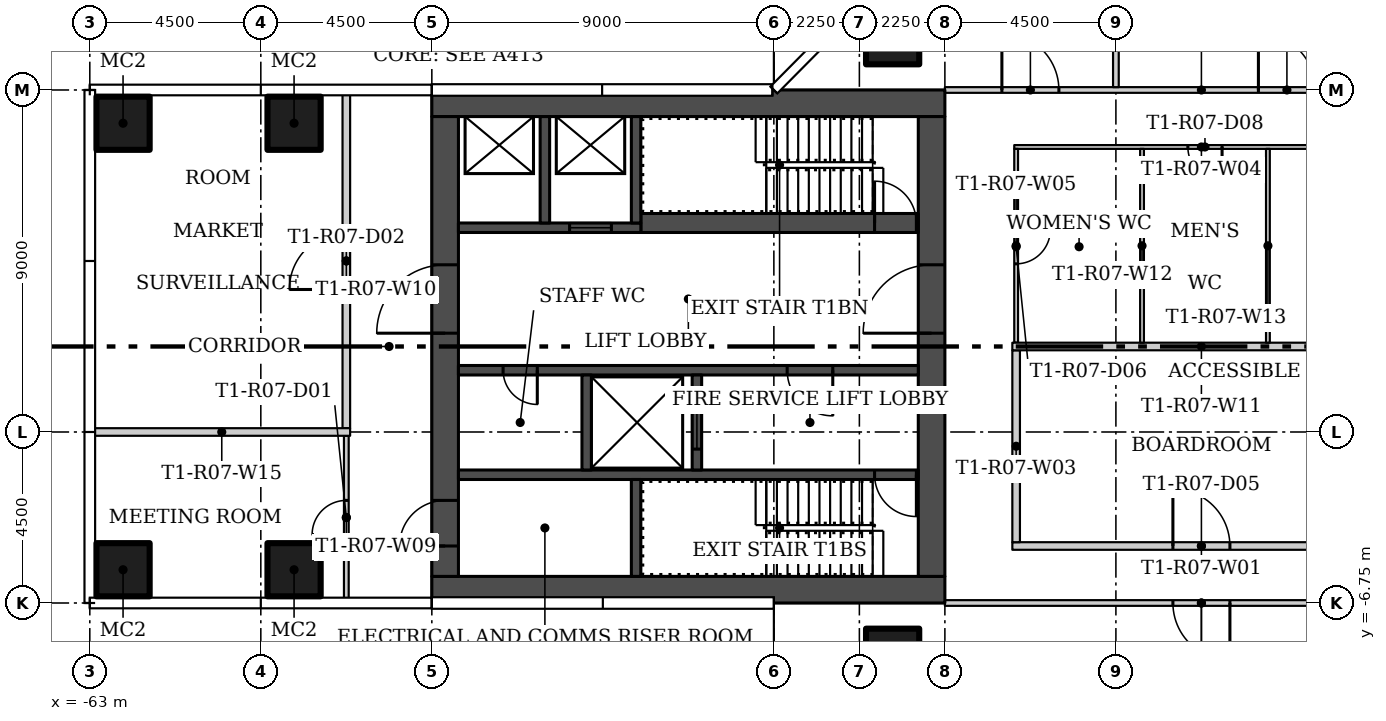
"""IFC4 building model, lengths in metres.
Left out: names, types, materials, properties, quantities, classifications, styles, units other than length and angle.
Written with IfcOpenShell. Run it as: python <this file> out.ifc"""

import sys

from ifc_helpers import new_model, si_unit, direction, frame, frame_2d, origin, origin_2d, place, context, subcontext, project, spatial, rectangle, hollow_rectangle, extrude, element, fill, save


model = new_model("IFC4")
c1 = context("Model", 3, precision=1e-05, world=origin(), true_north=direction((0.0, 1.0)))
c2 = subcontext(c1, "Body", "Model", "MODEL_VIEW")
j1 = project(units=[si_unit("LENGTHUNIT", "METRE"), si_unit("PLANEANGLEUNIT", "RADIAN")], contexts=[c1])
p1 = place(None, origin())
s1 = spatial("IfcSite", under=j1, at=p1, CompositionType="ELEMENT")
p2 = place(p1, origin())
s2 = spatial("IfcBuilding", under=s1, at=p2, CompositionType="ELEMENT")
p3 = place(p2, frame((0.0, 0.0, 73.2)))
s3 = spatial("IfcBuildingStorey", under=s2, at=p3, CompositionType="ELEMENT", Elevation=73.2)
for number, where in (
    (1, (-41.875, 8.125, 0.0)),
    (2, (-41.875, -8.125, 0.0)),
    (3, (-57.625, -5.875, 0.0)),
    (4, (-62.125, -5.875, 0.0)),
    (5, (-57.625, 5.875, 0.0)),
    (6, (-62.125, 5.875, 0.0)),
):
    element("IfcColumn", number, at=place(p3, frame(where)), inside=s3, PredefinedType="COLUMN", context=c2, shape_type="SweptSolid", body=[
        extrude(hollow_rectangle(XDim=1.4, YDim=1.4, WallThickness=0.05, at=origin_2d()), origin(), (0.0, 0.0, 1.0), 3.45),
    ])
p4 = place(p3, frame((-38.725, -5.25, 0.0)))
e7 = element("IfcWall", 7, at=p4, inside=s3, PredefinedType="PARTITIONING", context=c2, shape_type="SweptSolid", body=[
    extrude(rectangle(XDim=9.95, YDim=0.2, at=frame_2d((4.975, 0.0))), origin(), (0.0, 0.0, 1.0), 3.45),
])
p5 = place(p4, frame((4.225, 0.0, 0.0)))
e8 = element("IfcOpeningElement", 8, at=p5, cuts=e7, PredefinedType="OPENING", context=c2, shape_type="SweptSolid", body=[
    extrude(rectangle(XDim=1.5, YDim=2.4, at=frame_2d((0.75, 1.2))), frame((0.0, 0.11, 0.0), z_axis=(0.0, -1.0, 0.0), x_axis=(1.0, 0.0, 0.0)), (0.0, 0.0, 1.0), 0.22),
])
p6 = place(p3, frame((-38.625, -0.1, 0.0), z_axis=(0.0, 0.0, 1.0), x_axis=(0.0, -1.0, 0.0)))
e9 = element("IfcWall", 9, at=p6, inside=s3, PredefinedType="PARTITIONING", context=c2, shape_type="SweptSolid", body=[
    extrude(rectangle(XDim=5.05, YDim=0.2, at=frame_2d((2.525, 0.0))), origin(), (0.0, 0.0, 1.0), 3.45),
])
p7 = place(p3, frame((-28.825, 5.25, 0.0), z_axis=(0.0, 0.0, 1.0), x_axis=(-1.0, 0.0, 0.0)))
e10 = element("IfcWall", 10, at=p7, inside=s3, PredefinedType="PARTITIONING", context=c2, shape_type="SweptSolid", body=[
    extrude(rectangle(XDim=9.85, YDim=0.1, at=frame_2d((4.925, 0.0))), origin(), (0.0, 0.0, 1.0), 3.45),
])
p8 = place(p7, frame((4.381, 0.0, 0.0)))
e11 = element("IfcOpeningElement", 11, at=p8, cuts=e10, PredefinedType="OPENING", context=c2, shape_type="SweptSolid", body=[
    extrude(rectangle(XDim=0.9, YDim=2.1, at=frame_2d((0.45, 1.05))), frame((0.0, 0.06, 0.0), z_axis=(0.0, -1.0, 0.0), x_axis=(1.0, 0.0, 0.0)), (0.0, 0.0, 1.0), 0.12),
])
p9 = place(p3, frame((-38.625, 5.2, 0.0), z_axis=(0.0, 0.0, 1.0), x_axis=(0.0, -1.0, 0.0)))
e12 = element("IfcWall", 12, at=p9, inside=s3, PredefinedType="PARTITIONING", context=c2, shape_type="SweptSolid", body=[
    extrude(rectangle(XDim=5.1, YDim=0.1, at=frame_2d((2.55, 0.0))), origin(), (0.0, 0.0, 1.0), 3.45),
])
p10 = place(p9, frame((2.125, 0.0, 0.0)))
e13 = element("IfcOpeningElement", 13, at=p10, cuts=e12, PredefinedType="OPENING", context=c2, shape_type="SweptSolid", body=[
    extrude(rectangle(XDim=0.9, YDim=2.1, at=frame_2d((0.45, 1.05))), frame((0.0, 0.06, 0.0), z_axis=(0.0, -1.0, 0.0), x_axis=(1.0, 0.0, 0.0)), (0.0, 0.0, 1.0), 0.12),
])
p11 = place(p3, frame((-40.5, 6.75, 0.0)))
e14 = element("IfcWall", 14, at=p11, inside=s3, PredefinedType="PARTITIONING", context=c2, shape_type="SweptSolid", body=[
    extrude(rectangle(XDim=13.5, YDim=0.15, at=frame_2d((6.75, 0.0))), origin(), (0.0, 0.0, 1.0), 3.45),
])
p12 = place(p11, frame((1.5, 0.0, 0.0)))
e15 = element("IfcOpeningElement", 15, at=p12, cuts=e14, PredefinedType="OPENING", context=c2, shape_type="SweptSolid", body=[
    extrude(rectangle(XDim=1.5, YDim=2.1, at=frame_2d((0.75, 1.05))), frame((0.0, 0.085, 0.0), z_axis=(0.0, -1.0, 0.0), x_axis=(1.0, 0.0, 0.0)), (0.0, 0.0, 1.0), 0.17),
])
p13 = place(p11, frame((8.25, 0.0, 0.0)))
e16 = element("IfcOpeningElement", 16, at=p13, cuts=e14, PredefinedType="OPENING", context=c2, shape_type="SweptSolid", body=[
    extrude(rectangle(XDim=1.5, YDim=2.1, at=frame_2d((0.75, 1.05))), frame((0.0, 0.085, 0.0), z_axis=(0.0, -1.0, 0.0), x_axis=(1.0, 0.0, 0.0)), (0.0, 0.0, 1.0), 0.17),
])
p14 = place(p3, frame((-27.0, -6.75, 0.0), z_axis=(0.0, 0.0, 1.0), x_axis=(-1.0, 0.0, 0.0)))
e17 = element("IfcWall", 17, at=p14, inside=s3, PredefinedType="PARTITIONING", context=c2, shape_type="SweptSolid", body=[
    extrude(rectangle(XDim=13.5, YDim=0.15, at=frame_2d((6.75, 0.0))), origin(), (0.0, 0.0, 1.0), 3.45),
])
p15 = place(p14, frame((6.0, 0.0, 0.0)))
e18 = element("IfcOpeningElement", 18, at=p15, cuts=e17, PredefinedType="OPENING", context=c2, shape_type="SweptSolid", body=[
    extrude(rectangle(XDim=1.5, YDim=2.1, at=frame_2d((0.75, 1.05))), frame((0.0, 0.085, 0.0), z_axis=(0.0, -1.0, 0.0), x_axis=(1.0, 0.0, 0.0)), (0.0, 0.0, 1.0), 0.17),
])
p16 = place(p3, frame((-56.25, -6.655, 0.0), z_axis=(0.0, 0.0, 1.0), x_axis=(0.0, 1.0, 0.0)))
e19 = element("IfcWall", 19, at=p16, inside=s3, PredefinedType="PARTITIONING", context=c2, shape_type="SweptSolid", body=[
    extrude(rectangle(XDim=4.305, YDim=0.125, at=frame_2d((2.152, 0.0))), origin(), (0.0, 0.0, 1.0), 3.45),
])
p17 = place(p16, frame((1.705, 0.0, 0.0)))
e20 = element("IfcOpeningElement", 20, at=p17, cuts=e19, PredefinedType="OPENING", context=c2, shape_type="SweptSolid", body=[
    extrude(rectangle(XDim=0.9, YDim=2.1, at=frame_2d((0.45, 1.05))), frame((0.0, 0.073, 0.0), z_axis=(0.0, -1.0, 0.0), x_axis=(1.0, 0.0, 0.0)), (0.0, 0.0, 1.0), 0.145),
])
p18 = place(p3, frame((-56.25, -2.15, 0.0), z_axis=(0.0, 0.0, 1.0), x_axis=(0.0, 1.0, 0.0)))
e21 = element("IfcWall", 21, at=p18, inside=s3, PredefinedType="PARTITIONING", context=c2, shape_type="SweptSolid", body=[
    extrude(rectangle(XDim=8.805, YDim=0.2, at=frame_2d((4.402, 0.0))), origin(), (0.0, 0.0, 1.0), 3.45),
])
p19 = place(p18, frame((3.65, 0.0, 0.0)))
e22 = element("IfcOpeningElement", 22, at=p19, cuts=e21, PredefinedType="OPENING", context=c2, shape_type="SweptSolid", body=[
    extrude(rectangle(XDim=1.5, YDim=2.1, at=frame_2d((0.75, 1.05))), frame((0.0, 0.11, 0.0), z_axis=(0.0, -1.0, 0.0), x_axis=(1.0, 0.0, 0.0)), (0.0, 0.0, 1.0), 0.22),
])
p20 = place(p3, frame((-28.775, 0.0, 0.0), z_axis=(0.0, 0.0, 1.0), x_axis=(-1.0, 0.0, 0.0)))
e23 = element("IfcWall", 23, at=p20, inside=s3, PredefinedType="PARTITIONING", context=c2, shape_type="SweptSolid", body=[
    extrude(rectangle(XDim=9.95, YDim=0.2, at=frame_2d((4.975, 0.0))), origin(), (0.0, 0.0, 1.0), 3.45),
])
for number, where, z_axis, x_axis in (
    (24, (-35.312, 0.1, 0.0), (0.0, 0.0, 1.0), (0.0, 1.0, 0.0)),
    (25, (-32.0, 0.1, 0.0), (0.0, 0.0, 1.0), (0.0, 1.0, 0.0)),
):
    element("IfcWall", number, at=place(p3, frame(where, z_axis=z_axis, x_axis=x_axis)), inside=s3, PredefinedType="PARTITIONING", context=c2, shape_type="SweptSolid", body=[
        extrude(rectangle(XDim=5.1, YDim=0.1, at=frame_2d((2.55, 0.0))), origin(), (0.0, 0.0, 1.0), 3.45),
    ])
p21 = place(p3, frame((-36.0, 6.825, 0.0), z_axis=(0.0, 0.0, 1.0), x_axis=(0.0, 1.0, 0.0)))
e26 = element("IfcWall", 26, at=p21, inside=s3, PredefinedType="PARTITIONING", context=c2, shape_type="SweptSolid", body=[
    extrude(rectangle(XDim=17.83, YDim=0.15, at=frame_2d((8.915, 0.0))), origin(), (0.0, 0.0, 1.0), 3.45),
])
p22 = place(p3, frame((-56.15, -2.25, 0.0), z_axis=(0.0, 0.0, 1.0), x_axis=(-1.0, 0.0, 0.0)))
e27 = element("IfcWall", 27, at=p22, inside=s3, PredefinedType="PARTITIONING", context=c2, shape_type="SweptSolid", body=[
    extrude(rectangle(XDim=6.755, YDim=0.2, at=frame_2d((3.377, 0.0))), origin(), (0.0, 0.0, 1.0), 3.45),
])
for number, where, z_axis, x_axis in (
    (28, (-40.5, -6.4, 0.0), (0.0, 0.0, 1.0), (-1.0, 0.0, 0.0)),
    (29, (-40.5, 6.4, 0.0), (0.0, 0.0, 1.0), (-1.0, 0.0, 0.0)),
):
    element("IfcWall", number, at=place(p3, frame(where, z_axis=z_axis, x_axis=x_axis)), inside=s3, PredefinedType="SHEAR", context=c2, shape_type="SweptSolid", body=[
        extrude(rectangle(XDim=13.5, YDim=0.7, at=frame_2d((6.75, 0.0))), origin(), (0.0, 0.0, 1.0), 3.45),
    ])
p23 = place(p3, frame((-40.85, -6.05, 0.0), z_axis=(0.0, 0.0, 1.0), x_axis=(0.0, 1.0, 0.0)))
e30 = element("IfcWall", 30, at=p23, inside=s3, PredefinedType="SHEAR", context=c2, shape_type="SweptSolid", body=[
    extrude(rectangle(XDim=12.1, YDim=0.7, at=frame_2d((6.05, 0.0))), origin(), (0.0, 0.0, 1.0), 3.45),
])
p24 = place(p23, frame((6.4, 0.0, 0.0)))
e31 = element("IfcOpeningElement", 31, at=p24, cuts=e30, PredefinedType="OPENING", context=c2, shape_type="SweptSolid", body=[
    extrude(rectangle(XDim=1.8, YDim=2.4, at=frame_2d((0.9, 1.2))), frame((0.0, 0.36, 0.0), z_axis=(0.0, -1.0, 0.0), x_axis=(1.0, 0.0, 0.0)), (0.0, 0.0, 1.0), 0.72),
])
p25 = place(p3, frame((-53.65, -6.05, 0.0), z_axis=(0.0, 0.0, 1.0), x_axis=(0.0, 1.0, 0.0)))
e32 = element("IfcWall", 32, at=p25, inside=s3, PredefinedType="SHEAR", context=c2, shape_type="SweptSolid", body=[
    extrude(rectangle(XDim=12.1, YDim=0.7, at=frame_2d((6.05, 0.0))), origin(), (0.0, 0.0, 1.0), 3.45),
])
p26 = place(p25, frame((0.8, 0.0, 0.0)))
e33 = element("IfcOpeningElement", 33, at=p26, cuts=e32, PredefinedType="OPENING", context=c2, shape_type="SweptSolid", body=[
    extrude(rectangle(XDim=1.2, YDim=2.1, at=frame_2d((0.6, 1.05))), frame((0.0, 0.36, 0.0), z_axis=(0.0, -1.0, 0.0), x_axis=(1.0, 0.0, 0.0)), (0.0, 0.0, 1.0), 0.72),
])
p27 = place(p25, frame((6.4, 0.0, 0.0)))
e34 = element("IfcOpeningElement", 34, at=p27, cuts=e32, PredefinedType="OPENING", context=c2, shape_type="SweptSolid", body=[
    extrude(rectangle(XDim=1.8, YDim=2.4, at=frame_2d((0.9, 1.2))), frame((0.0, 0.36, 0.0), z_axis=(0.0, -1.0, 0.0), x_axis=(1.0, 0.0, 0.0)), (0.0, 0.0, 1.0), 0.72),
])
p28 = place(p3, frame((-41.2, -3.375, 0.0), z_axis=(0.0, 0.0, 1.0), x_axis=(-1.0, 0.0, 0.0)))
e35 = element("IfcWall", 35, at=p28, inside=s3, PredefinedType="SHEAR", context=c2, shape_type="SweptSolid", body=[
    extrude(rectangle(XDim=12.1, YDim=0.25, at=frame_2d((6.05, 0.0))), origin(), (0.0, 0.0, 1.0), 3.45),
])
p29 = place(p28, frame((0.05, 0.0, 0.0)))
e36 = element("IfcOpeningElement", 36, at=p29, cuts=e35, PredefinedType="OPENING", context=c2, shape_type="SweptSolid", body=[
    extrude(rectangle(XDim=1.1, YDim=2.1, at=frame_2d((0.55, 1.05))), frame((0.0, 0.135, 0.0), z_axis=(0.0, -1.0, 0.0), x_axis=(1.0, 0.0, 0.0)), (0.0, 0.0, 1.0), 0.27),
])
p30 = place(p3, frame((-48.625, -6.05, 0.0), z_axis=(0.0, 0.0, 1.0), x_axis=(0.0, 1.0, 0.0)))
e37 = element("IfcWall", 37, at=p30, inside=s3, PredefinedType="SHEAR", context=c2, shape_type="SweptSolid", body=[
    extrude(rectangle(XDim=2.55, YDim=0.25, at=frame_2d((1.275, 0.0))), origin(), (0.0, 0.0, 1.0), 3.45),
])
p31 = place(p3, frame((-41.2, -0.625, 0.0), z_axis=(0.0, 0.0, 1.0), x_axis=(-1.0, 0.0, 0.0)))
e38 = element("IfcWall", 38, at=p31, inside=s3, PredefinedType="SHEAR", context=c2, shape_type="SweptSolid", body=[
    extrude(rectangle(XDim=12.1, YDim=0.25, at=frame_2d((6.05, 0.0))), origin(), (0.0, 0.0, 1.0), 3.45),
])
p32 = place(p31, frame((2.25, 0.0, 0.0)))
e39 = element("IfcOpeningElement", 39, at=p32, cuts=e38, PredefinedType="OPENING", context=c2, shape_type="SweptSolid", body=[
    extrude(rectangle(XDim=1.2, YDim=2.1, at=frame_2d((0.6, 1.05))), frame((0.0, 0.135, 0.0), z_axis=(0.0, -1.0, 0.0), x_axis=(1.0, 0.0, 0.0)), (0.0, 0.0, 1.0), 0.27),
])
p33 = place(p31, frame((10.025, 0.0, 0.0)))
e40 = element("IfcOpeningElement", 40, at=p33, cuts=e38, PredefinedType="OPENING", context=c2, shape_type="SweptSolid", body=[
    extrude(rectangle(XDim=0.9, YDim=2.1, at=frame_2d((0.45, 1.05))), frame((0.0, 0.135, 0.0), z_axis=(0.0, -1.0, 0.0), x_axis=(1.0, 0.0, 0.0)), (0.0, 0.0, 1.0), 0.27),
])
p34 = place(p3, frame((-47.025, -3.25, 0.0), z_axis=(0.0, 0.0, 1.0), x_axis=(0.0, 1.0, 0.0)))
e41 = element("IfcWall", 41, at=p34, inside=s3, PredefinedType="SHEAR", context=c2, shape_type="SweptSolid", body=[
    extrude(rectangle(XDim=2.5, YDim=0.25, at=frame_2d((1.25, 0.0))), origin(), (0.0, 0.0, 1.0), 3.45),
])
p35 = place(p34, frame((0.55, 0.0, 0.0)))
e42 = element("IfcOpeningElement", 42, at=p35, cuts=e41, PredefinedType="OPENING", context=c2, shape_type="SweptSolid", body=[
    extrude(rectangle(XDim=1.4, YDim=2.4, at=frame_2d((0.7, 1.2))), frame((0.0, 0.135, 0.0), z_axis=(0.0, -1.0, 0.0), x_axis=(1.0, 0.0, 0.0)), (0.0, 0.0, 1.0), 0.27),
])
p36 = place(p3, frame((-49.925, -3.25, 0.0), z_axis=(0.0, 0.0, 1.0), x_axis=(0.0, 1.0, 0.0)))
e43 = element("IfcWall", 43, at=p36, inside=s3, PredefinedType="SHEAR", context=c2, shape_type="SweptSolid", body=[
    extrude(rectangle(XDim=2.5, YDim=0.25, at=frame_2d((1.25, 0.0))), origin(), (0.0, 0.0, 1.0), 3.45),
])
p37 = place(p3, frame((-48.5, 3.25, 0.0)))
e44 = element("IfcWall", 44, at=p37, inside=s3, PredefinedType="SHEAR", context=c2, shape_type="SweptSolid", body=[
    extrude(rectangle(XDim=7.3, YDim=0.5, at=frame_2d((3.65, 0.0))), origin(), (0.0, 0.0, 1.0), 3.45),
])
p38 = place(p37, frame((6.15, 0.0, 0.0)))
e45 = element("IfcOpeningElement", 45, at=p38, cuts=e44, PredefinedType="OPENING", context=c2, shape_type="SweptSolid", body=[
    extrude(rectangle(XDim=1.1, YDim=2.1, at=frame_2d((0.55, 1.05))), frame((0.0, 0.26, 0.0), z_axis=(0.0, -1.0, 0.0), x_axis=(1.0, 0.0, 0.0)), (0.0, 0.0, 1.0), 0.52),
])
p39 = place(p3, frame((-48.5, 3.125, 0.0), z_axis=(0.0, 0.0, 1.0), x_axis=(-1.0, 0.0, 0.0)))
e46 = element("IfcWall", 46, at=p39, inside=s3, PredefinedType="SHEAR", context=c2, shape_type="SweptSolid", body=[
    extrude(rectangle(XDim=4.8, YDim=0.25, at=frame_2d((2.4, 0.0))), origin(), (0.0, 0.0, 1.0), 3.45),
])
p40 = place(p39, frame((0.775, 0.0, 0.0)))
e47 = element("IfcOpeningElement", 47, at=p40, cuts=e46, PredefinedType="OPENING", context=c2, shape_type="SweptSolid", body=[
    extrude(rectangle(XDim=1.1, YDim=2.1, at=frame_2d((0.55, 1.05))), frame((0.0, 0.135, 0.0), z_axis=(0.0, -1.0, 0.0), x_axis=(1.0, 0.0, 0.0)), (0.0, 0.0, 1.0), 0.27),
])
for number, where, z_axis, x_axis in (
    (48, (-48.625, 3.25, 0.0), (0.0, 0.0, 1.0), (0.0, 1.0, 0.0)),
    (49, (-51.025, 3.25, 0.0), (0.0, 0.0, 1.0), (0.0, 1.0, 0.0)),
):
    element("IfcWall", number, at=place(p3, frame(where, z_axis=z_axis, x_axis=x_axis)), inside=s3, PredefinedType="SHEAR", context=c2, shape_type="SweptSolid", body=[
        extrude(rectangle(XDim=2.8, YDim=0.25, at=frame_2d((1.4, 0.0))), origin(), (0.0, 0.0, 1.0), 3.45),
    ])
p41 = place(p17, origin())
e50 = element("IfcDoor", 50, at=p41, inside=s3, OperationType="SINGLE_SWING_RIGHT", PredefinedType="DOOR", context=c2, shape_type="SweptSolid", body=[
    extrude(rectangle(XDim=0.9, YDim=2.1, at=frame_2d((0.45, 1.05))), frame((0.0, 0.025, 0.0), z_axis=(0.0, -1.0, 0.0), x_axis=(1.0, 0.0, 0.0)), (0.0, 0.0, 1.0), 0.05),
])
fill(e20, e50)
p42 = place(p19, origin())
e51 = element("IfcDoor", 51, at=p42, inside=s3, OperationType="DOUBLE_DOOR_SINGLE_SWING", PredefinedType="DOOR", context=c2, shape_type="SweptSolid", body=[
    extrude(rectangle(XDim=1.5, YDim=2.1, at=frame_2d((0.75, 1.05))), frame((0.0, 0.025, 0.0), z_axis=(0.0, -1.0, 0.0), x_axis=(1.0, 0.0, 0.0)), (0.0, 0.0, 1.0), 0.05),
])
fill(e22, e51)
p43 = place(p12, origin())
e52 = element("IfcDoor", 52, at=p43, inside=s3, OperationType="DOUBLE_DOOR_SINGLE_SWING", PredefinedType="DOOR", context=c2, shape_type="SweptSolid", body=[
    extrude(rectangle(XDim=1.5, YDim=2.1, at=frame_2d((0.75, 1.05))), frame((0.0, 0.025, 0.0), z_axis=(0.0, -1.0, 0.0), x_axis=(1.0, 0.0, 0.0)), (0.0, 0.0, 1.0), 0.05),
])
fill(e15, e52)
p44 = place(p13, origin())
e53 = element("IfcDoor", 53, at=p44, inside=s3, OperationType="DOUBLE_DOOR_SINGLE_SWING", PredefinedType="DOOR", context=c2, shape_type="SweptSolid", body=[
    extrude(rectangle(XDim=1.5, YDim=2.1, at=frame_2d((0.75, 1.05))), frame((0.0, 0.025, 0.0), z_axis=(0.0, -1.0, 0.0), x_axis=(1.0, 0.0, 0.0)), (0.0, 0.0, 1.0), 0.05),
])
fill(e16, e53)
p45 = place(p5, origin())
e54 = element("IfcDoor", 54, at=p45, inside=s3, OperationType="DOUBLE_DOOR_SINGLE_SWING", PredefinedType="DOOR", context=c2, shape_type="SweptSolid", body=[
    extrude(rectangle(XDim=1.5, YDim=2.4, at=frame_2d((0.75, 1.2))), frame((0.0, 0.025, 0.0), z_axis=(0.0, -1.0, 0.0), x_axis=(1.0, 0.0, 0.0)), (0.0, 0.0, 1.0), 0.05),
])
fill(e8, e54)
p46 = place(p10, origin())
e55 = element("IfcDoor", 55, at=p46, inside=s3, OperationType="SINGLE_SWING_LEFT", PredefinedType="DOOR", context=c2, shape_type="SweptSolid", body=[
    extrude(rectangle(XDim=0.9, YDim=2.1, at=frame_2d((0.45, 1.05))), frame((0.0, 0.025, 0.0), z_axis=(0.0, -1.0, 0.0), x_axis=(1.0, 0.0, 0.0)), (0.0, 0.0, 1.0), 0.05),
])
fill(e13, e55)
p47 = place(p8, origin())
e56 = element("IfcDoor", 56, at=p47, inside=s3, OperationType="SINGLE_SWING_RIGHT", PredefinedType="DOOR", context=c2, shape_type="SweptSolid", body=[
    extrude(rectangle(XDim=0.9, YDim=2.1, at=frame_2d((0.45, 1.05))), frame((0.0, 0.025, 0.0), z_axis=(0.0, -1.0, 0.0), x_axis=(1.0, 0.0, 0.0)), (0.0, 0.0, 1.0), 0.05),
])
fill(e11, e56)
p48 = place(p15, origin())
e57 = element("IfcDoor", 57, at=p48, inside=s3, OperationType="DOUBLE_DOOR_SINGLE_SWING", PredefinedType="DOOR", context=c2, shape_type="SweptSolid", body=[
    extrude(rectangle(XDim=1.5, YDim=2.1, at=frame_2d((0.75, 1.05))), frame((0.0, 0.025, 0.0), z_axis=(0.0, -1.0, 0.0), x_axis=(1.0, 0.0, 0.0)), (0.0, 0.0, 1.0), 0.05),
])
fill(e18, e57)
p49 = place(p24, origin())
e58 = element("IfcDoor", 58, at=p49, inside=s3, OperationType="DOUBLE_DOOR_SINGLE_SWING", PredefinedType="DOOR", context=c2, shape_type="SweptSolid", body=[
    extrude(rectangle(XDim=1.8, YDim=2.4, at=frame_2d((0.9, 1.2))), frame((0.0, 0.025, 0.0), z_axis=(0.0, -1.0, 0.0), x_axis=(1.0, 0.0, 0.0)), (0.0, 0.0, 1.0), 0.05),
])
fill(e31, e58)
p50 = place(p26, origin())
e59 = element("IfcDoor", 59, at=p50, inside=s3, OperationType="SINGLE_SWING_LEFT", PredefinedType="DOOR", context=c2, shape_type="SweptSolid", body=[
    extrude(rectangle(XDim=1.2, YDim=2.1, at=frame_2d((0.6, 1.05))), frame((0.0, 0.025, 0.0), z_axis=(0.0, -1.0, 0.0), x_axis=(1.0, 0.0, 0.0)), (0.0, 0.0, 1.0), 0.05),
])
fill(e33, e59)
p51 = place(p27, origin())
e60 = element("IfcDoor", 60, at=p51, inside=s3, OperationType="DOUBLE_DOOR_SINGLE_SWING", PredefinedType="DOOR", context=c2, shape_type="SweptSolid", body=[
    extrude(rectangle(XDim=1.8, YDim=2.4, at=frame_2d((0.9, 1.2))), frame((0.0, 0.025, 0.0), z_axis=(0.0, -1.0, 0.0), x_axis=(1.0, 0.0, 0.0)), (0.0, 0.0, 1.0), 0.05),
])
fill(e34, e60)
p52 = place(p29, origin())
e61 = element("IfcDoor", 61, at=p52, inside=s3, OperationType="SINGLE_SWING_LEFT", PredefinedType="DOOR", context=c2, shape_type="SweptSolid", body=[
    extrude(rectangle(XDim=1.1, YDim=2.1, at=frame_2d((0.55, 1.05))), frame((0.0, 0.025, 0.0), z_axis=(0.0, -1.0, 0.0), x_axis=(1.0, 0.0, 0.0)), (0.0, 0.0, 1.0), 0.05),
])
fill(e36, e61)
p53 = place(p32, origin())
e62 = element("IfcDoor", 62, at=p53, inside=s3, OperationType="SINGLE_SWING_LEFT", PredefinedType="DOOR", context=c2, shape_type="SweptSolid", body=[
    extrude(rectangle(XDim=1.2, YDim=2.1, at=frame_2d((0.6, 1.05))), frame((0.0, 0.025, 0.0), z_axis=(0.0, -1.0, 0.0), x_axis=(1.0, 0.0, 0.0)), (0.0, 0.0, 1.0), 0.05),
])
fill(e39, e62)
p54 = place(p33, origin())
e63 = element("IfcDoor", 63, at=p54, inside=s3, OperationType="SINGLE_SWING_RIGHT", PredefinedType="DOOR", context=c2, shape_type="SweptSolid", body=[
    extrude(rectangle(XDim=0.9, YDim=2.1, at=frame_2d((0.45, 1.05))), frame((0.0, 0.025, 0.0), z_axis=(0.0, -1.0, 0.0), x_axis=(1.0, 0.0, 0.0)), (0.0, 0.0, 1.0), 0.05),
])
fill(e40, e63)
p55 = place(p35, origin())
e64 = element("IfcDoor", 64, at=p55, inside=s3, OperationType="SLIDING_TO_LEFT", PredefinedType="DOOR", context=c2, shape_type="SweptSolid", body=[
    extrude(rectangle(XDim=1.4, YDim=2.4, at=frame_2d((0.7, 1.2))), frame((0.0, 0.025, 0.0), z_axis=(0.0, -1.0, 0.0), x_axis=(1.0, 0.0, 0.0)), (0.0, 0.0, 1.0), 0.05),
])
fill(e42, e64)
p56 = place(p38, origin())
e65 = element("IfcDoor", 65, at=p56, inside=s3, OperationType="SINGLE_SWING_RIGHT", PredefinedType="DOOR", context=c2, shape_type="SweptSolid", body=[
    extrude(rectangle(XDim=1.1, YDim=2.1, at=frame_2d((0.55, 1.05))), frame((0.0, 0.025, 0.0), z_axis=(0.0, -1.0, 0.0), x_axis=(1.0, 0.0, 0.0)), (0.0, 0.0, 1.0), 0.05),
])
fill(e45, e65)
p57 = place(p40, origin())
e66 = element("IfcDoor", 66, at=p57, inside=s3, OperationType="SLIDING_TO_LEFT", PredefinedType="DOOR", context=c2, shape_type="SweptSolid", body=[
    extrude(rectangle(XDim=1.1, YDim=2.1, at=frame_2d((0.55, 1.05))), frame((0.0, 0.025, 0.0), z_axis=(0.0, -1.0, 0.0), x_axis=(1.0, 0.0, 0.0)), (0.0, 0.0, 1.0), 0.05),
])
fill(e47, e66)
save(model, sys.argv[1])
